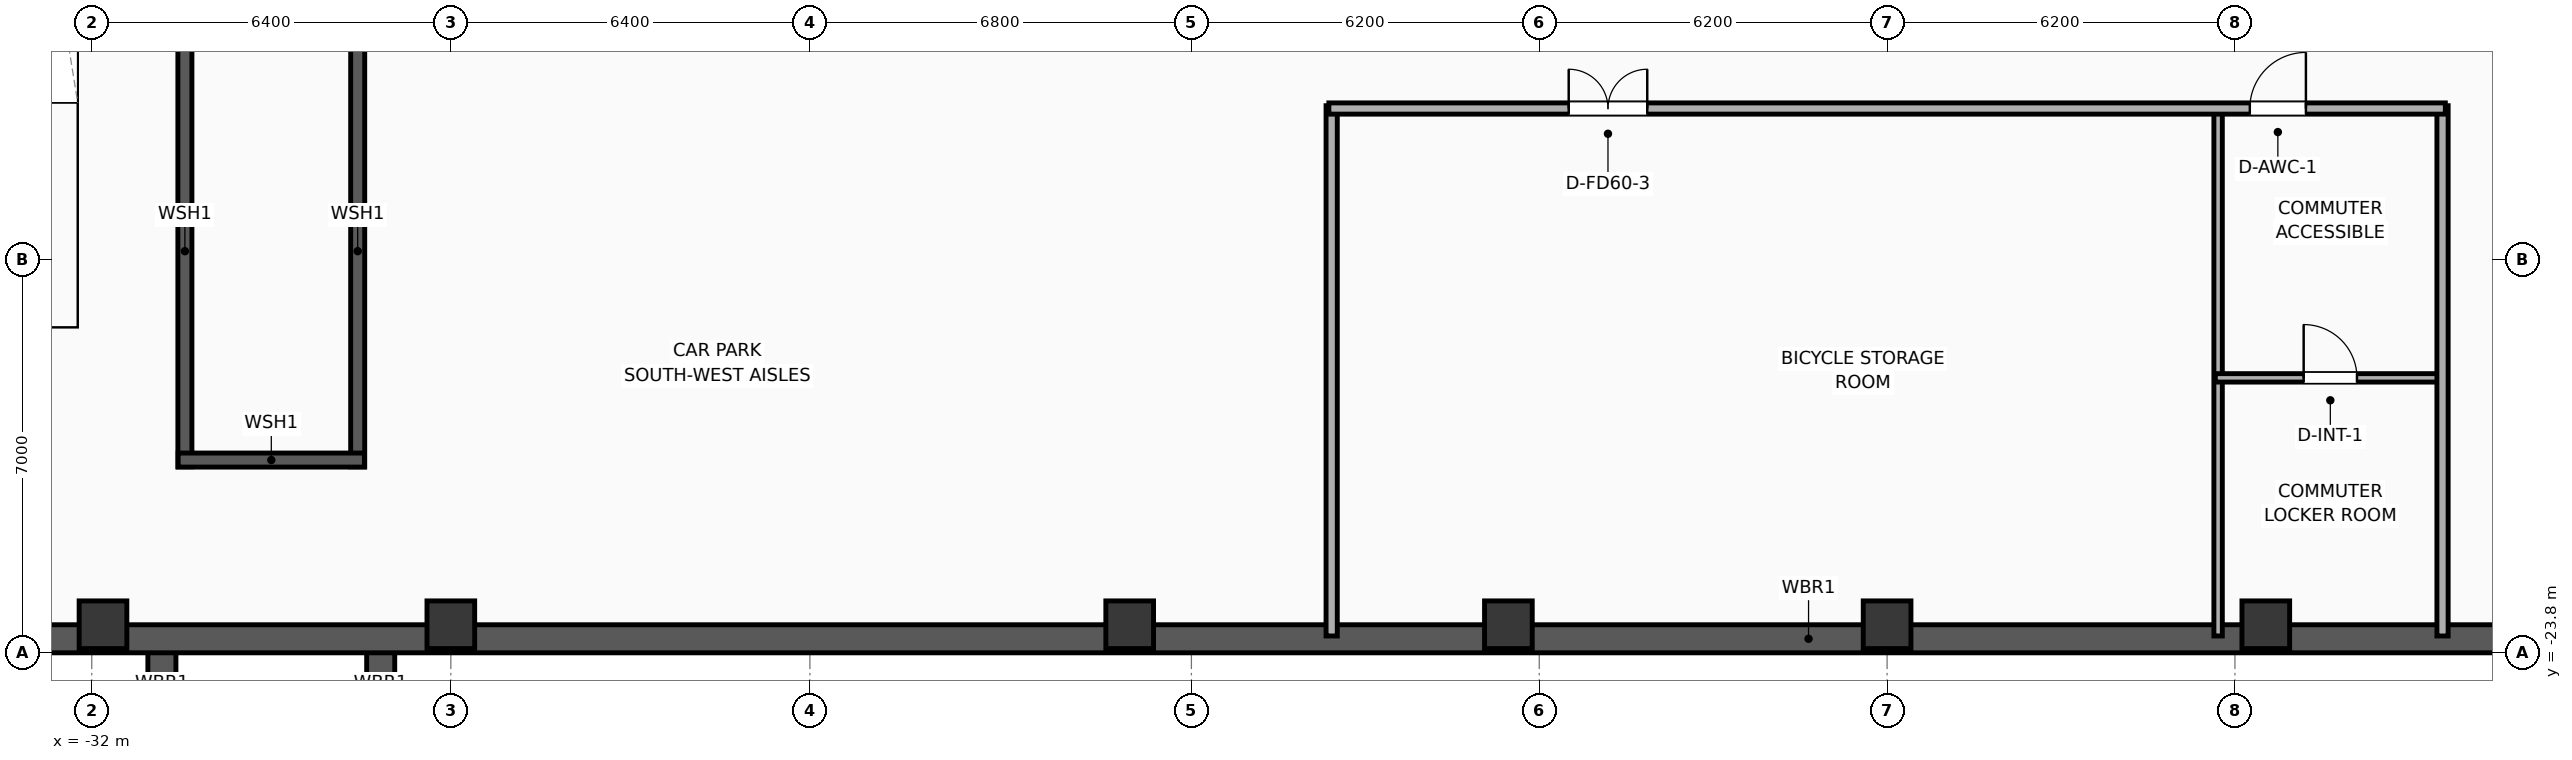
"""IFC4 building model, lengths in metres.
Left out: names, types, materials, properties, quantities, classifications, styles, units other than length and angle.
Written with IfcOpenShell. Run it as: python <this file> out.ifc"""

import sys

from ifc_helpers import new_model, si_unit, direction, frame, frame_2d, origin, origin_2d, place, context, subcontext, project, spatial, rectangle, extrude, element, fill, save


model = new_model("IFC4")
c1 = context("Model", 3, precision=1e-05, world=origin(), true_north=direction((0.0, 1.0)))
c2 = subcontext(c1, "Body", "Model", "MODEL_VIEW")
j1 = project(units=[si_unit("LENGTHUNIT", "METRE"), si_unit("PLANEANGLEUNIT", "RADIAN")], contexts=[c1])
p1 = place(None, origin())
s1 = spatial("IfcSite", under=j1, at=p1, CompositionType="ELEMENT")
p2 = place(p1, origin())
s2 = spatial("IfcBuilding", under=s1, at=p2, CompositionType="ELEMENT")
p3 = place(p2, frame((0.0, 0.0, -5.2)))
s3 = spatial("IfcBuildingStorey", under=s2, at=p3, CompositionType="ELEMENT", Elevation=-5.2)
for number, where, z_axis, x_axis in (
    (1, (-30.75, -26.95, 0.0), (0.0, 0.0, 1.0), (0.0, 1.0, 0.0)),
    (2, (-26.85, -26.95, 0.0), (0.0, 0.0, 1.0), (0.0, 1.0, 0.0)),
):
    element("IfcWall", number, at=place(p3, frame(where, z_axis=z_axis, x_axis=x_axis)), inside=s3, PredefinedType="USERDEFINED", context=c2, shape_type="SweptSolid", body=[
        extrude(rectangle(XDim=3.4, YDim=0.5, at=frame_2d((1.7, 0.0))), origin(), (0.0, 0.0, 1.0), 5.02),
    ])
for number, where, z_axis, x_axis in (
    (3, (-30.34, -20.485, 0.0), (0.0, 0.0, 1.0), (0.0, 1.0, 0.0)),
    (4, (-27.26, -20.485, 0.0), (0.0, 0.0, 1.0), (0.0, 1.0, 0.0)),
):
    element("IfcWall", number, at=place(p3, frame(where, z_axis=z_axis, x_axis=x_axis)), inside=s3, PredefinedType="SOLIDWALL", context=c2, shape_type="SweptSolid", body=[
        extrude(rectangle(XDim=7.685, YDim=0.25, at=frame_2d((3.843, 0.0))), origin(), (0.0, 0.0, 1.0), 4.92),
    ])
p4 = place(p3, frame((-30.46, -20.365, 0.0), z_axis=(0.0, 0.0, 1.0), x_axis=(1.0, 0.0, 0.0)))
e5 = element("IfcWall", 5, at=p4, inside=s3, PredefinedType="SOLIDWALL", context=c2, shape_type="SweptSolid", body=[
    extrude(rectangle(XDim=3.32, YDim=0.25, at=frame_2d((1.66, 0.0))), origin(), (0.0, 0.0, 1.0), 4.92),
])
p5 = place(p3, frame((-38.4, -23.55, 0.0), z_axis=(0.0, 0.0, 1.0), x_axis=(1.0, 0.0, 0.0)))
e6 = element("IfcWall", 6, at=p5, inside=s3, PredefinedType="USERDEFINED", context=c2, shape_type="SweptSolid", body=[
    extrude(rectangle(XDim=74.0, YDim=0.5, at=frame_2d((37.0, 0.0))), origin(), (0.0, 0.0, 1.0), 4.92),
])
for number, where, z_axis, x_axis in (
    (7, (-31.8, -23.3, 0.0), (0.0, 0.0, 1.0), (1.0, 0.0, 0.0)),
    (8, (-25.6, -23.3, 0.0), (0.0, 0.0, 1.0), (1.0, 0.0, 0.0)),
    (9, (-13.5, -23.3, 0.0), (0.0, 0.0, 1.0), (1.0, 0.0, 0.0)),
    (10, (-6.75, -23.3, 0.0), (0.0, 0.0, 1.0), (1.0, 0.0, 0.0)),
    (11, (0.0, -23.3, 0.0), (0.0, 0.0, 1.0), (1.0, 0.0, 0.0)),
    (12, (6.75, -23.3, 0.0), (0.0, 0.0, 1.0), (1.0, 0.0, 0.0)),
):
    element("IfcColumn", number, at=place(p3, frame(where, z_axis=z_axis, x_axis=x_axis)), inside=s3, PredefinedType="COLUMN", context=c2, shape_type="SweptSolid", body=[
        extrude(rectangle(XDim=0.85, YDim=0.85, at=origin_2d()), origin(), (0.0, 0.0, 1.0), 5.2),
    ])
p6 = place(p3, frame((5.9, -23.5, 0.0), z_axis=(0.0, 0.0, 1.0), x_axis=(0.0, 1.0, 0.0)))
e13 = element("IfcWall", 13, at=p6, inside=s3, PredefinedType="PLUMBINGWALL", context=c2, shape_type="SweptSolid", body=[
    extrude(rectangle(XDim=9.45, YDim=0.15, at=frame_2d((4.725, 0.0))), origin(), (0.0, 0.0, 1.0), 4.92),
])
p7 = place(p3, frame((5.85, -18.9, 0.0), z_axis=(0.0, 0.0, 1.0), x_axis=(1.0, 0.0, 0.0)))
e14 = element("IfcWall", 14, at=p7, inside=s3, PredefinedType="PLUMBINGWALL", context=c2, shape_type="SweptSolid", body=[
    extrude(rectangle(XDim=4.1, YDim=0.15, at=frame_2d((2.05, 0.0))), origin(), (0.0, 0.0, 1.0), 4.92),
])
p8 = place(p7, frame((1.575, 0.0, 0.0)))
e15 = element("IfcOpeningElement", 15, at=p8, cuts=e14, PredefinedType="OPENING", context=c2, shape_type="SweptSolid", body=[
    extrude(rectangle(XDim=0.95, YDim=2.05, at=frame_2d((0.475, 1.025))), frame((0.0, 0.085, 0.0), z_axis=(0.0, -1.0, 0.0), x_axis=(1.0, 0.0, 0.0)), (0.0, 0.0, 1.0), 0.17),
])
for number, where, z_axis, x_axis in (
    (16, (-9.9, -23.5, 0.0), (0.0, 0.0, 1.0), (0.0, 1.0, 0.0)),
    (17, (9.9, -23.5, 0.0), (0.0, 0.0, 1.0), (0.0, 1.0, 0.0)),
):
    element("IfcWall", number, at=place(p3, frame(where, z_axis=z_axis, x_axis=x_axis)), inside=s3, PredefinedType="PARTITIONING", context=c2, shape_type="SweptSolid", body=[
        extrude(rectangle(XDim=9.45, YDim=0.2, at=frame_2d((4.725, 0.0))), origin(), (0.0, 0.0, 1.0), 4.92),
    ])
p9 = place(p3, frame((-9.95, -14.1, 0.0), z_axis=(0.0, 0.0, 1.0), x_axis=(1.0, 0.0, 0.0)))
e18 = element("IfcWall", 18, at=p9, inside=s3, PredefinedType="PARTITIONING", context=c2, shape_type="SweptSolid", body=[
    extrude(rectangle(XDim=19.9, YDim=0.2, at=frame_2d((9.95, 0.0))), origin(), (0.0, 0.0, 1.0), 4.92),
])
p10 = place(p9, frame((4.275, 0.0, 0.0)))
e19 = element("IfcOpeningElement", 19, at=p10, cuts=e18, PredefinedType="OPENING", context=c2, shape_type="SweptSolid", body=[
    extrude(rectangle(XDim=1.4, YDim=2.05, at=frame_2d((0.7, 1.025))), frame((0.0, 0.11, 0.0), z_axis=(0.0, -1.0, 0.0), x_axis=(1.0, 0.0, 0.0)), (0.0, 0.0, 1.0), 0.22),
])
p11 = place(p9, frame((16.415, 0.0, 0.0)))
e20 = element("IfcOpeningElement", 20, at=p11, cuts=e18, PredefinedType="OPENING", context=c2, shape_type="SweptSolid", body=[
    extrude(rectangle(XDim=1.0, YDim=2.05, at=frame_2d((0.5, 1.025))), frame((0.0, 0.11, 0.0), z_axis=(0.0, -1.0, 0.0), x_axis=(1.0, 0.0, 0.0)), (0.0, 0.0, 1.0), 0.22),
])
p12 = place(p8, origin())
e21 = element("IfcDoor", 21, at=p12, inside=s3, OperationType="SINGLE_SWING_LEFT", PredefinedType="DOOR", context=c2, shape_type="SweptSolid", body=[
    extrude(rectangle(XDim=0.95, YDim=2.05, at=frame_2d((0.475, 1.025))), frame((0.0, 0.025, 0.0), z_axis=(0.0, -1.0, 0.0), x_axis=(1.0, 0.0, 0.0)), (0.0, 0.0, 1.0), 0.05),
])
fill(e15, e21)
p13 = place(p10, origin())
e22 = element("IfcDoor", 22, at=p13, inside=s3, OperationType="DOUBLE_DOOR_SINGLE_SWING", PredefinedType="DOOR", context=c2, shape_type="SweptSolid", body=[
    extrude(rectangle(XDim=1.4, YDim=2.05, at=frame_2d((0.7, 1.025))), frame((0.0, 0.025, 0.0), z_axis=(0.0, -1.0, 0.0), x_axis=(1.0, 0.0, 0.0)), (0.0, 0.0, 1.0), 0.05),
])
fill(e19, e22)
p14 = place(p11, origin())
e23 = element("IfcDoor", 23, at=p14, inside=s3, OperationType="SINGLE_SWING_RIGHT", PredefinedType="DOOR", context=c2, shape_type="SweptSolid", body=[
    extrude(rectangle(XDim=1.0, YDim=2.05, at=frame_2d((0.5, 1.025))), frame((0.0, 0.025, 0.0), z_axis=(0.0, -1.0, 0.0), x_axis=(1.0, 0.0, 0.0)), (0.0, 0.0, 1.0), 0.05),
])
fill(e20, e23)
save(model, sys.argv[1])
